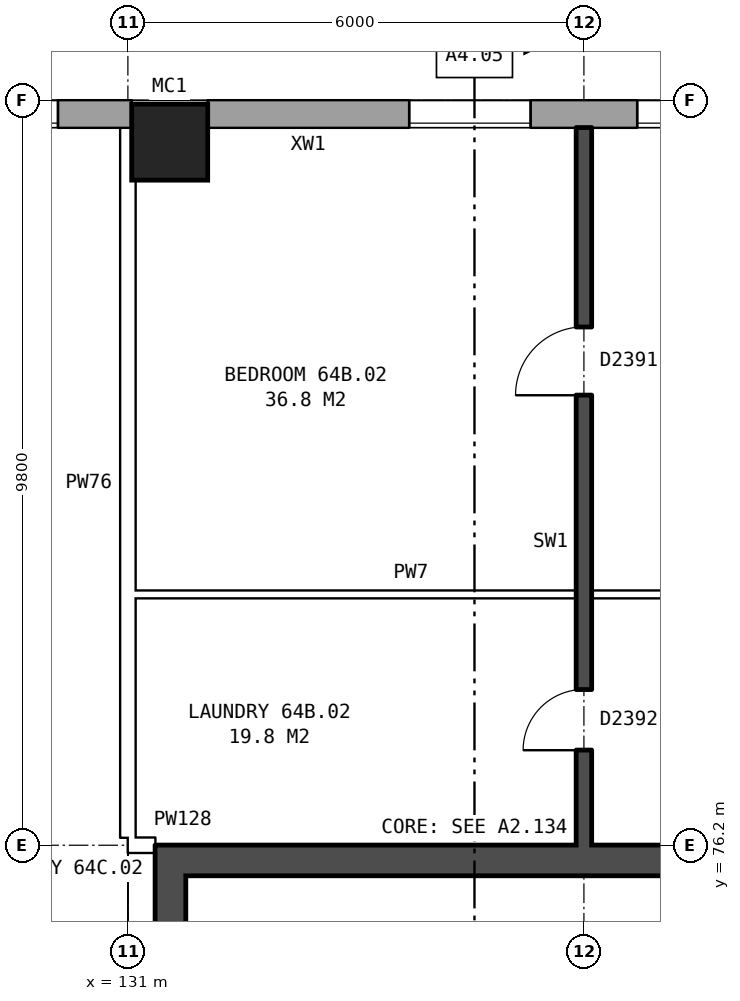
"""IFC4 building model, lengths in metres.
Left out: names, types, materials, properties, quantities, classifications, styles, units other than length and angle.
Written with IfcOpenShell. Run it as: python <this file> out.ifc"""

import sys

from ifc_helpers import new_model, si_unit, direction, frame, frame_2d, origin, origin_2d, place, context, subcontext, project, spatial, rectangle, hollow_rectangle, extrude, element, fill, save


model = new_model("IFC4")
c1 = context("Model", 3, precision=1e-05, world=origin(), true_north=direction((0.0, 1.0)))
c2 = subcontext(c1, "Body", "Model", "MODEL_VIEW")
j1 = project(units=[si_unit("LENGTHUNIT", "METRE"), si_unit("PLANEANGLEUNIT", "RADIAN")], contexts=[c1])
p1 = place(None, origin())
s1 = spatial("IfcSite", under=j1, at=p1, CompositionType="ELEMENT")
p2 = place(p1, origin())
s2 = spatial("IfcBuilding", under=s1, at=p2, CompositionType="ELEMENT")
p3 = place(p2, frame((0.0, 0.0, 227.6)))
s3 = spatial("IfcBuildingStorey", under=s2, at=p3, CompositionType="ELEMENT", Elevation=227.6)
p4 = place(p3, frame((131.55, 85.45, 0.0), z_axis=(0.0, 0.0, 1.0), x_axis=(1.0, 0.0, 0.0)))
e1 = element("IfcColumn", 1, at=p4, inside=s3, PredefinedType="COLUMN", context=c2, shape_type="SweptSolid", body=[
    extrude(hollow_rectangle(XDim=1.0, YDim=1.0, WallThickness=0.055, at=origin_2d()), origin(), (0.0, 0.0, 1.0), 3.1),
])
p5 = place(p3, frame((165.925, 85.82, 0.0), z_axis=(0.0, 0.0, 1.0), x_axis=(-1.0, 0.0, 0.0)))
e2 = element("IfcWall", 2, at=p5, inside=s3, PredefinedType="STANDARD", context=c2, shape_type="SweptSolid", body=[
    extrude(rectangle(XDim=33.875, YDim=0.36, at=frame_2d((16.938, 0.0))), origin(), (0.0, 0.0, 1.0), 2.85),
])
p6 = place(p5, frame((2.625, 0.0, 0.8)))
e3 = element("IfcOpeningElement", 3, at=p6, cuts=e2, PredefinedType="OPENING", context=c2, shape_type="SweptSolid", body=[
    extrude(rectangle(XDim=1.6, YDim=1.8, at=frame_2d((0.8, 0.9))), frame((0.0, 0.19, 0.0), z_axis=(0.0, -1.0, 0.0), x_axis=(1.0, 0.0, 0.0)), (0.0, 0.0, 1.0), 0.38),
])
p7 = place(p5, frame((5.625, 0.0, 0.8)))
e4 = element("IfcOpeningElement", 4, at=p7, cuts=e2, PredefinedType="OPENING", context=c2, shape_type="SweptSolid", body=[
    extrude(rectangle(XDim=1.6, YDim=1.8, at=frame_2d((0.8, 0.9))), frame((0.0, 0.19, 0.0), z_axis=(0.0, -1.0, 0.0), x_axis=(1.0, 0.0, 0.0)), (0.0, 0.0, 1.0), 0.38),
])
p8 = place(p5, frame((8.625, 0.0, 0.8)))
e5 = element("IfcOpeningElement", 5, at=p8, cuts=e2, PredefinedType="OPENING", context=c2, shape_type="SweptSolid", body=[
    extrude(rectangle(XDim=1.6, YDim=1.8, at=frame_2d((0.8, 0.9))), frame((0.0, 0.19, 0.0), z_axis=(0.0, -1.0, 0.0), x_axis=(1.0, 0.0, 0.0)), (0.0, 0.0, 1.0), 0.38),
])
p9 = place(p5, frame((12.675, 0.0, 0.15)))
e6 = element("IfcOpeningElement", 6, at=p9, cuts=e2, PredefinedType="OPENING", context=c2, shape_type="SweptSolid", body=[
    extrude(rectangle(XDim=1.0, YDim=1.8, at=frame_2d((0.5, 0.9))), frame((0.0, 0.19, 0.0), z_axis=(0.0, -1.0, 0.0), x_axis=(1.0, 0.0, 0.0)), (0.0, 0.0, 1.0), 0.38),
])
p10 = place(p5, frame((14.625, 0.0, 0.8)))
e7 = element("IfcOpeningElement", 7, at=p10, cuts=e2, PredefinedType="OPENING", context=c2, shape_type="SweptSolid", body=[
    extrude(rectangle(XDim=1.6, YDim=1.8, at=frame_2d((0.8, 0.9))), frame((0.0, 0.19, 0.0), z_axis=(0.0, -1.0, 0.0), x_axis=(1.0, 0.0, 0.0)), (0.0, 0.0, 1.0), 0.38),
])
p11 = place(p5, frame((17.125, 0.0, 0.8)))
e8 = element("IfcOpeningElement", 8, at=p11, cuts=e2, PredefinedType="OPENING", context=c2, shape_type="SweptSolid", body=[
    extrude(rectangle(XDim=1.6, YDim=1.8, at=frame_2d((0.8, 0.9))), frame((0.0, 0.19, 0.0), z_axis=(0.0, -1.0, 0.0), x_axis=(1.0, 0.0, 0.0)), (0.0, 0.0, 1.0), 0.38),
])
p12 = place(p5, frame((20.425, 0.0, 1.7)))
e9 = element("IfcOpeningElement", 9, at=p12, cuts=e2, PredefinedType="OPENING", context=c2, shape_type="SweptSolid", body=[
    extrude(rectangle(XDim=0.6, YDim=0.9, at=frame_2d((0.3, 0.45))), frame((0.0, 0.19, 0.0), z_axis=(0.0, -1.0, 0.0), x_axis=(1.0, 0.0, 0.0)), (0.0, 0.0, 1.0), 0.38),
])
p13 = place(p5, frame((23.625, 0.0, 0.8)))
e10 = element("IfcOpeningElement", 10, at=p13, cuts=e2, PredefinedType="OPENING", context=c2, shape_type="SweptSolid", body=[
    extrude(rectangle(XDim=1.6, YDim=1.8, at=frame_2d((0.8, 0.9))), frame((0.0, 0.19, 0.0), z_axis=(0.0, -1.0, 0.0), x_axis=(1.0, 0.0, 0.0)), (0.0, 0.0, 1.0), 0.38),
])
p14 = place(p5, frame((26.625, 0.0, 0.8)))
e11 = element("IfcOpeningElement", 11, at=p14, cuts=e2, PredefinedType="OPENING", context=c2, shape_type="SweptSolid", body=[
    extrude(rectangle(XDim=1.6, YDim=1.8, at=frame_2d((0.8, 0.9))), frame((0.0, 0.19, 0.0), z_axis=(0.0, -1.0, 0.0), x_axis=(1.0, 0.0, 0.0)), (0.0, 0.0, 1.0), 0.38),
])
p15 = place(p5, frame((29.625, 0.0, 0.8)))
e12 = element("IfcOpeningElement", 12, at=p15, cuts=e2, PredefinedType="OPENING", context=c2, shape_type="SweptSolid", body=[
    extrude(rectangle(XDim=1.6, YDim=1.8, at=frame_2d((0.8, 0.9))), frame((0.0, 0.19, 0.0), z_axis=(0.0, -1.0, 0.0), x_axis=(1.0, 0.0, 0.0)), (0.0, 0.0, 1.0), 0.38),
])
p16 = place(p5, frame((21.325, 0.0, 0.8)))
e13 = element("IfcOpeningElement", 13, at=p16, cuts=e2, PredefinedType="OPENING", context=c2, shape_type="SweptSolid", body=[
    extrude(rectangle(XDim=1.4, YDim=1.8, at=frame_2d((0.7, 0.9))), frame((0.0, 0.19, 0.0), z_axis=(0.0, -1.0, 0.0), x_axis=(1.0, 0.0, 0.0)), (0.0, 0.0, 1.0), 0.38),
])
p17 = place(p3, frame((131.05, 85.82, 0.0), z_axis=(0.0, 0.0, 1.0), x_axis=(-1.0, 0.0, 0.0)))
e14 = element("IfcWall", 14, at=p17, inside=s3, PredefinedType="STANDARD", context=c2, shape_type="SweptSolid", body=[
    extrude(rectangle(XDim=55.1, YDim=0.36, at=frame_2d((27.55, 0.0))), origin(), (0.0, 0.0, 1.0), 2.85),
])
p18 = place(p17, frame((0.969, 0.0, 0.8)))
e15 = element("IfcOpeningElement", 15, at=p18, cuts=e14, PredefinedType="OPENING", context=c2, shape_type="SweptSolid", body=[
    extrude(rectangle(XDim=1.6, YDim=1.8, at=frame_2d((0.8, 0.9))), frame((0.0, 0.19, 0.0), z_axis=(0.0, -1.0, 0.0), x_axis=(1.0, 0.0, 0.0)), (0.0, 0.0, 1.0), 0.38),
])
p19 = place(p17, frame((4.406, 0.0, 0.8)))
e16 = element("IfcOpeningElement", 16, at=p19, cuts=e14, PredefinedType="OPENING", context=c2, shape_type="SweptSolid", body=[
    extrude(rectangle(XDim=1.6, YDim=1.8, at=frame_2d((0.8, 0.9))), frame((0.0, 0.19, 0.0), z_axis=(0.0, -1.0, 0.0), x_axis=(1.0, 0.0, 0.0)), (0.0, 0.0, 1.0), 0.38),
])
p20 = place(p17, frame((7.844, 0.0, 0.8)))
e17 = element("IfcOpeningElement", 17, at=p20, cuts=e14, PredefinedType="OPENING", context=c2, shape_type="SweptSolid", body=[
    extrude(rectangle(XDim=1.6, YDim=1.8, at=frame_2d((0.8, 0.9))), frame((0.0, 0.19, 0.0), z_axis=(0.0, -1.0, 0.0), x_axis=(1.0, 0.0, 0.0)), (0.0, 0.0, 1.0), 0.38),
])
p21 = place(p17, frame((11.281, 0.0, 0.8)))
e18 = element("IfcOpeningElement", 18, at=p21, cuts=e14, PredefinedType="OPENING", context=c2, shape_type="SweptSolid", body=[
    extrude(rectangle(XDim=1.6, YDim=1.8, at=frame_2d((0.8, 0.9))), frame((0.0, 0.19, 0.0), z_axis=(0.0, -1.0, 0.0), x_axis=(1.0, 0.0, 0.0)), (0.0, 0.0, 1.0), 0.38),
])
p22 = place(p17, frame((14.719, 0.0, 0.8)))
e19 = element("IfcOpeningElement", 19, at=p22, cuts=e14, PredefinedType="OPENING", context=c2, shape_type="SweptSolid", body=[
    extrude(rectangle(XDim=1.6, YDim=1.8, at=frame_2d((0.8, 0.9))), frame((0.0, 0.19, 0.0), z_axis=(0.0, -1.0, 0.0), x_axis=(1.0, 0.0, 0.0)), (0.0, 0.0, 1.0), 0.38),
])
p23 = place(p17, frame((18.156, 0.0, 0.8)))
e20 = element("IfcOpeningElement", 20, at=p23, cuts=e14, PredefinedType="OPENING", context=c2, shape_type="SweptSolid", body=[
    extrude(rectangle(XDim=1.6, YDim=1.8, at=frame_2d((0.8, 0.9))), frame((0.0, 0.19, 0.0), z_axis=(0.0, -1.0, 0.0), x_axis=(1.0, 0.0, 0.0)), (0.0, 0.0, 1.0), 0.38),
])
p24 = place(p17, frame((21.594, 0.0, 0.8)))
e21 = element("IfcOpeningElement", 21, at=p24, cuts=e14, PredefinedType="OPENING", context=c2, shape_type="SweptSolid", body=[
    extrude(rectangle(XDim=1.6, YDim=1.8, at=frame_2d((0.8, 0.9))), frame((0.0, 0.19, 0.0), z_axis=(0.0, -1.0, 0.0), x_axis=(1.0, 0.0, 0.0)), (0.0, 0.0, 1.0), 0.38),
])
p25 = place(p17, frame((25.031, 0.0, 0.8)))
e22 = element("IfcOpeningElement", 22, at=p25, cuts=e14, PredefinedType="OPENING", context=c2, shape_type="SweptSolid", body=[
    extrude(rectangle(XDim=1.6, YDim=1.8, at=frame_2d((0.8, 0.9))), frame((0.0, 0.19, 0.0), z_axis=(0.0, -1.0, 0.0), x_axis=(1.0, 0.0, 0.0)), (0.0, 0.0, 1.0), 0.38),
])
p26 = place(p17, frame((28.469, 0.0, 0.8)))
e23 = element("IfcOpeningElement", 23, at=p26, cuts=e14, PredefinedType="OPENING", context=c2, shape_type="SweptSolid", body=[
    extrude(rectangle(XDim=1.6, YDim=1.8, at=frame_2d((0.8, 0.9))), frame((0.0, 0.19, 0.0), z_axis=(0.0, -1.0, 0.0), x_axis=(1.0, 0.0, 0.0)), (0.0, 0.0, 1.0), 0.38),
])
p27 = place(p17, frame((31.906, 0.0, 0.8)))
e24 = element("IfcOpeningElement", 24, at=p27, cuts=e14, PredefinedType="OPENING", context=c2, shape_type="SweptSolid", body=[
    extrude(rectangle(XDim=1.6, YDim=1.8, at=frame_2d((0.8, 0.9))), frame((0.0, 0.19, 0.0), z_axis=(0.0, -1.0, 0.0), x_axis=(1.0, 0.0, 0.0)), (0.0, 0.0, 1.0), 0.38),
])
p28 = place(p17, frame((35.344, 0.0, 0.8)))
e25 = element("IfcOpeningElement", 25, at=p28, cuts=e14, PredefinedType="OPENING", context=c2, shape_type="SweptSolid", body=[
    extrude(rectangle(XDim=1.6, YDim=1.8, at=frame_2d((0.8, 0.9))), frame((0.0, 0.19, 0.0), z_axis=(0.0, -1.0, 0.0), x_axis=(1.0, 0.0, 0.0)), (0.0, 0.0, 1.0), 0.38),
])
p29 = place(p17, frame((38.781, 0.0, 0.8)))
e26 = element("IfcOpeningElement", 26, at=p29, cuts=e14, PredefinedType="OPENING", context=c2, shape_type="SweptSolid", body=[
    extrude(rectangle(XDim=1.6, YDim=1.8, at=frame_2d((0.8, 0.9))), frame((0.0, 0.19, 0.0), z_axis=(0.0, -1.0, 0.0), x_axis=(1.0, 0.0, 0.0)), (0.0, 0.0, 1.0), 0.38),
])
p30 = place(p17, frame((42.219, 0.0, 0.8)))
e27 = element("IfcOpeningElement", 27, at=p30, cuts=e14, PredefinedType="OPENING", context=c2, shape_type="SweptSolid", body=[
    extrude(rectangle(XDim=1.6, YDim=1.8, at=frame_2d((0.8, 0.9))), frame((0.0, 0.19, 0.0), z_axis=(0.0, -1.0, 0.0), x_axis=(1.0, 0.0, 0.0)), (0.0, 0.0, 1.0), 0.38),
])
p31 = place(p17, frame((45.656, 0.0, 0.8)))
e28 = element("IfcOpeningElement", 28, at=p31, cuts=e14, PredefinedType="OPENING", context=c2, shape_type="SweptSolid", body=[
    extrude(rectangle(XDim=1.6, YDim=1.8, at=frame_2d((0.8, 0.9))), frame((0.0, 0.19, 0.0), z_axis=(0.0, -1.0, 0.0), x_axis=(1.0, 0.0, 0.0)), (0.0, 0.0, 1.0), 0.38),
])
p32 = place(p17, frame((49.094, 0.0, 0.8)))
e29 = element("IfcOpeningElement", 29, at=p32, cuts=e14, PredefinedType="OPENING", context=c2, shape_type="SweptSolid", body=[
    extrude(rectangle(XDim=1.6, YDim=1.8, at=frame_2d((0.8, 0.9))), frame((0.0, 0.19, 0.0), z_axis=(0.0, -1.0, 0.0), x_axis=(1.0, 0.0, 0.0)), (0.0, 0.0, 1.0), 0.38),
])
p33 = place(p17, frame((52.531, 0.0, 0.8)))
e30 = element("IfcOpeningElement", 30, at=p33, cuts=e14, PredefinedType="OPENING", context=c2, shape_type="SweptSolid", body=[
    extrude(rectangle(XDim=1.6, YDim=1.8, at=frame_2d((0.8, 0.9))), frame((0.0, 0.19, 0.0), z_axis=(0.0, -1.0, 0.0), x_axis=(1.0, 0.0, 0.0)), (0.0, 0.0, 1.0), 0.38),
])
p34 = place(p3, frame((131.56, 63.8, 0.0), z_axis=(0.0, 0.0, 1.0), x_axis=(0.0, 1.0, 0.0)))
e31 = element("IfcWall", 31, at=p34, inside=s3, PredefinedType="SHEAR", context=c2, shape_type="SweptSolid", body=[
    extrude(rectangle(XDim=12.4, YDim=0.4, at=frame_2d((6.2, 0.0))), origin(), (0.0, 0.0, 1.0), 2.85),
])
p35 = place(p34, frame((9.8, 0.0, 0.0)))
e32 = element("IfcOpeningElement", 32, at=p35, cuts=e31, PredefinedType="OPENING", context=c2, shape_type="SweptSolid", body=[
    extrude(rectangle(XDim=1.1, YDim=2.1, at=frame_2d((0.55, 1.05))), frame((0.0, 0.21, 0.0), z_axis=(0.0, -1.0, 0.0), x_axis=(1.0, 0.0, 0.0)), (0.0, 0.0, 1.0), 0.42),
])
p36 = place(p3, frame((139.36, 76.0, 0.0), z_axis=(0.0, 0.0, 1.0), x_axis=(-1.0, 0.0, 0.0)))
e33 = element("IfcWall", 33, at=p36, inside=s3, PredefinedType="SHEAR", context=c2, shape_type="SweptSolid", body=[
    extrude(rectangle(XDim=7.6, YDim=0.4, at=frame_2d((3.8, 0.0))), origin(), (0.0, 0.0, 1.0), 2.85),
])
p37 = place(p3, frame((131.0, 76.2, 0.0), z_axis=(0.0, 0.0, 1.0), x_axis=(1.0, 0.0, 0.0)))
e34 = element("IfcWall", 34, at=p37, inside=s3, PredefinedType="PARTITIONING", context=c2, shape_type="SweptSolid", body=[
    extrude(rectangle(XDim=0.36, YDim=0.2, at=frame_2d((0.18, 0.0))), origin(), (0.0, 0.0, 1.0), 2.85),
])
p38 = place(p3, frame((131.1, 79.5, 0.0), z_axis=(0.0, 0.0, 1.0), x_axis=(1.0, 0.0, 0.0)))
e35 = element("IfcWall", 35, at=p38, inside=s3, PredefinedType="PARTITIONING", context=c2, shape_type="SweptSolid", body=[
    extrude(rectangle(XDim=11.8, YDim=0.1, at=frame_2d((5.9, 0.0))), origin(), (0.0, 0.0, 1.0), 2.85),
])
p39 = place(p38, frame((7.25, 0.0, 0.0)))
e36 = element("IfcOpeningElement", 36, at=p39, cuts=e35, PredefinedType="OPENING", context=c2, shape_type="SweptSolid", body=[
    extrude(rectangle(XDim=0.9, YDim=2.1, at=frame_2d((0.45, 1.05))), frame((0.0, 0.06, 0.0), z_axis=(0.0, -1.0, 0.0), x_axis=(1.0, 0.0, 0.0)), (0.0, 0.0, 1.0), 0.12),
])
p40 = place(p38, frame((10.2, 0.0, 0.0)))
e37 = element("IfcOpeningElement", 37, at=p40, cuts=e35, PredefinedType="OPENING", context=c2, shape_type="SweptSolid", body=[
    extrude(rectangle(XDim=0.9, YDim=2.1, at=frame_2d((0.45, 1.05))), frame((0.0, 0.06, 0.0), z_axis=(0.0, -1.0, 0.0), x_axis=(1.0, 0.0, 0.0)), (0.0, 0.0, 1.0), 0.12),
])
p41 = place(p3, frame((131.0, 76.3, 0.0), z_axis=(0.0, 0.0, 1.0), x_axis=(0.0, 1.0, 0.0)))
e38 = element("IfcWall", 38, at=p41, inside=s3, PredefinedType="PARTITIONING", context=c2, shape_type="SweptSolid", body=[
    extrude(rectangle(XDim=9.34, YDim=0.2, at=frame_2d((4.67, 0.0))), origin(), (0.0, 0.0, 1.0), 2.85),
])
p42 = place(p3, frame((137.0, 76.2, 0.0), z_axis=(0.0, 0.0, 1.0), x_axis=(0.0, 1.0, 0.0)))
e39 = element("IfcWall", 39, at=p42, inside=s3, PredefinedType="SOLIDWALL", context=c2, shape_type="SweptSolid", body=[
    extrude(rectangle(XDim=9.44, YDim=0.2, at=frame_2d((4.72, 0.0))), origin(), (0.0, 0.0, 1.0), 2.85),
])
p43 = place(p42, frame((5.92, 0.0, 0.0)))
e40 = element("IfcOpeningElement", 40, at=p43, cuts=e39, PredefinedType="OPENING", context=c2, shape_type="SweptSolid", body=[
    extrude(rectangle(XDim=0.9, YDim=2.1, at=frame_2d((0.45, 1.05))), frame((0.0, 0.11, 0.0), z_axis=(0.0, -1.0, 0.0), x_axis=(1.0, 0.0, 0.0)), (0.0, 0.0, 1.0), 0.22),
])
p44 = place(p42, frame((1.25, 0.0, 0.0)))
e41 = element("IfcOpeningElement", 41, at=p44, cuts=e39, PredefinedType="OPENING", context=c2, shape_type="SweptSolid", body=[
    extrude(rectangle(XDim=0.8, YDim=2.1, at=frame_2d((0.4, 1.05))), frame((0.0, 0.11, 0.0), z_axis=(0.0, -1.0, 0.0), x_axis=(1.0, 0.0, 0.0)), (0.0, 0.0, 1.0), 0.22),
])
p45 = place(p14, origin())
e42 = element("IfcWindow", 42, at=p45, inside=s3, PartitioningType="SINGLE_PANEL", PredefinedType="WINDOW", context=c2, shape_type="SweptSolid", body=[
    extrude(rectangle(XDim=1.6, YDim=1.8, at=frame_2d((0.8, 0.9))), frame((0.0, 0.15, 0.0), z_axis=(0.0, -1.0, 0.0), x_axis=(1.0, 0.0, 0.0)), (0.0, 0.0, 1.0), 0.06),
])
fill(e11, e42)
p46 = place(p15, origin())
e43 = element("IfcWindow", 43, at=p46, inside=s3, PartitioningType="SINGLE_PANEL", PredefinedType="WINDOW", context=c2, shape_type="SweptSolid", body=[
    extrude(rectangle(XDim=1.6, YDim=1.8, at=frame_2d((0.8, 0.9))), frame((0.0, 0.15, 0.0), z_axis=(0.0, -1.0, 0.0), x_axis=(1.0, 0.0, 0.0)), (0.0, 0.0, 1.0), 0.06),
])
fill(e12, e43)
p47 = place(p18, origin())
e44 = element("IfcWindow", 44, at=p47, inside=s3, PartitioningType="SINGLE_PANEL", PredefinedType="WINDOW", context=c2, shape_type="SweptSolid", body=[
    extrude(rectangle(XDim=1.6, YDim=1.8, at=frame_2d((0.8, 0.9))), frame((0.0, 0.15, 0.0), z_axis=(0.0, -1.0, 0.0), x_axis=(1.0, 0.0, 0.0)), (0.0, 0.0, 1.0), 0.06),
])
fill(e15, e44)
p48 = place(p43, origin())
e45 = element("IfcDoor", 45, at=p48, inside=s3, OperationType="SINGLE_SWING_LEFT", PredefinedType="DOOR", context=c2, shape_type="SweptSolid", body=[
    extrude(rectangle(XDim=0.9, YDim=2.1, at=frame_2d((0.45, 1.05))), frame((0.0, 0.025, 0.0), z_axis=(0.0, -1.0, 0.0), x_axis=(1.0, 0.0, 0.0)), (0.0, 0.0, 1.0), 0.05),
])
fill(e40, e45)
p49 = place(p44, origin())
e46 = element("IfcDoor", 46, at=p49, inside=s3, OperationType="SINGLE_SWING_LEFT", PredefinedType="DOOR", context=c2, shape_type="SweptSolid", body=[
    extrude(rectangle(XDim=0.8, YDim=2.1, at=frame_2d((0.4, 1.05))), frame((0.0, 0.025, 0.0), z_axis=(0.0, -1.0, 0.0), x_axis=(1.0, 0.0, 0.0)), (0.0, 0.0, 1.0), 0.05),
])
fill(e41, e46)
save(model, sys.argv[1])
